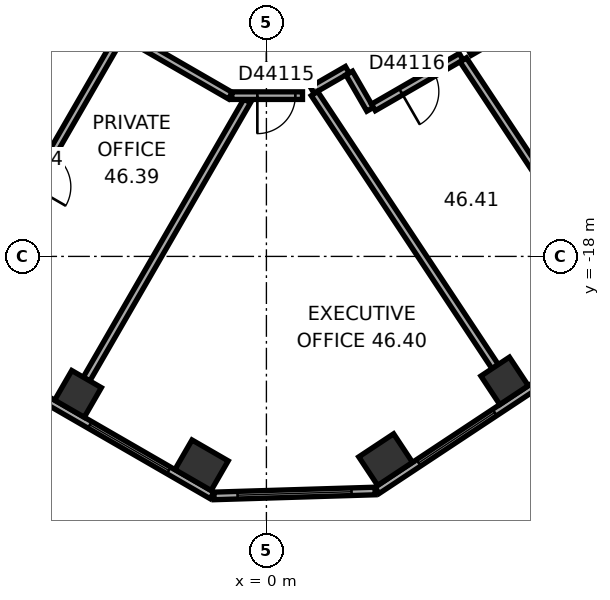
"""IFC4 building model, lengths in metres.
Left out: names, types, materials, properties, quantities, classifications, styles, units other than length and angle.
Written with IfcOpenShell. Run it as: python <this file> out.ifc"""

import sys

from ifc_helpers import new_model, si_unit, direction, frame, frame_2d, origin, origin_2d, place, context, subcontext, project, spatial, rectangle, extrude, element, fill, save


model = new_model("IFC4")
c1 = context("Model", 3, precision=1e-05, world=origin(), true_north=direction((0.0, 1.0)))
c2 = subcontext(c1, "Body", "Model", "MODEL_VIEW")
j1 = project(units=[si_unit("LENGTHUNIT", "METRE"), si_unit("PLANEANGLEUNIT", "RADIAN")], contexts=[c1])
p1 = place(None, origin())
s1 = spatial("IfcSite", under=j1, at=p1, CompositionType="ELEMENT")
p2 = place(p1, origin())
s2 = spatial("IfcBuilding", under=s1, at=p2, CompositionType="ELEMENT")
p3 = place(p2, frame((0.0, 0.0, 187.3)))
s3 = spatial("IfcBuildingStorey", under=s2, at=p3, CompositionType="ELEMENT", Elevation=187.3)
p4 = place(p3, frame((-4.958, -21.617, 0.0), z_axis=(0.0, 0.0, 1.0), x_axis=(0.866025403784, -0.5, 0.0)))
e1 = element("IfcColumn", 1, at=p4, inside=s3, PredefinedType="COLUMN", context=c2, shape_type="SweptSolid", body=[
    extrude(rectangle(XDim=0.9, YDim=0.9, at=origin_2d()), origin(), (0.0, 0.0, 1.0), 3.7),
])
for number, where, z_axis, x_axis in (
    (2, (-1.706, -23.494, 0.0), (0.0, 0.0, 1.0), (0.866, -0.5, 0.0)),
    (3, (3.137, -23.346, 0.0), (0.0, 0.0, 1.0), (0.834, 0.552, 0.0)),
):
    element("IfcColumn", number, at=place(p3, frame(where, z_axis=z_axis, x_axis=x_axis)), inside=s3, PredefinedType="COLUMN", context=c2, shape_type="SweptSolid", body=[
        extrude(rectangle(XDim=1.1, YDim=0.9, at=origin_2d()), origin(), (0.0, 0.0, 1.0), 3.7),
    ])
p5 = place(p3, frame((6.268, -21.274, 0.0), z_axis=(0.0, 0.0, 1.0), x_axis=(0.833885822067, 0.551936985312, 0.0)))
e4 = element("IfcColumn", 4, at=p5, inside=s3, PredefinedType="COLUMN", context=c2, shape_type="SweptSolid", body=[
    extrude(rectangle(XDim=0.9, YDim=0.9, at=origin_2d()), origin(), (0.0, 0.0, 1.0), 3.7),
])
p6 = place(p3, frame((-18.789, -14.267, 0.0), z_axis=(0.0, 0.0, 1.0), x_axis=(0.866023315909, -0.500003616288, 0.0)))
e5 = element("IfcWall", 5, at=p6, inside=s3, PredefinedType="STANDARD", context=c2, shape_type="SweptSolid", body=[
    extrude(rectangle(XDim=20.044, YDim=0.2, at=frame_2d((10.022, 0.0))), origin(), (0.0, 0.0, 1.0), 3.7),
])
p7 = place(p6, frame((1.314, 0.0, 0.9)))
e6 = element("IfcOpeningElement", 6, at=p7, cuts=e5, PredefinedType="OPENING", context=c2, shape_type="SweptSolid", body=[
    extrude(rectangle(XDim=2.4, YDim=2.0, at=frame_2d((1.2, 1.0))), frame((0.0, 0.11, 0.0), z_axis=(0.0, -1.0, 0.0), x_axis=(1.0, 0.0, 0.0)), (0.0, 0.0, 1.0), 0.22),
])
p8 = place(p6, frame((5.069, 0.0, 0.9)))
e7 = element("IfcOpeningElement", 7, at=p8, cuts=e5, PredefinedType="OPENING", context=c2, shape_type="SweptSolid", body=[
    extrude(rectangle(XDim=2.4, YDim=2.0, at=frame_2d((1.2, 1.0))), frame((0.0, 0.11, 0.0), z_axis=(0.0, -1.0, 0.0), x_axis=(1.0, 0.0, 0.0)), (0.0, 0.0, 1.0), 0.22),
])
p9 = place(p6, frame((8.823, 0.0, 0.9)))
e8 = element("IfcOpeningElement", 8, at=p9, cuts=e5, PredefinedType="OPENING", context=c2, shape_type="SweptSolid", body=[
    extrude(rectangle(XDim=2.4, YDim=2.0, at=frame_2d((1.2, 1.0))), frame((0.0, 0.11, 0.0), z_axis=(0.0, -1.0, 0.0), x_axis=(1.0, 0.0, 0.0)), (0.0, 0.0, 1.0), 0.22),
])
p10 = place(p6, frame((12.577, 0.0, 0.9)))
e9 = element("IfcOpeningElement", 9, at=p10, cuts=e5, PredefinedType="OPENING", context=c2, shape_type="SweptSolid", body=[
    extrude(rectangle(XDim=2.4, YDim=2.0, at=frame_2d((1.2, 1.0))), frame((0.0, 0.11, 0.0), z_axis=(0.0, -1.0, 0.0), x_axis=(1.0, 0.0, 0.0)), (0.0, 0.0, 1.0), 0.22),
])
p11 = place(p6, frame((16.331, 0.0, 0.9)))
e10 = element("IfcOpeningElement", 10, at=p11, cuts=e5, PredefinedType="OPENING", context=c2, shape_type="SweptSolid", body=[
    extrude(rectangle(XDim=2.4, YDim=2.0, at=frame_2d((1.2, 1.0))), frame((0.0, 0.11, 0.0), z_axis=(0.0, -1.0, 0.0), x_axis=(1.0, 0.0, 0.0)), (0.0, 0.0, 1.0), 0.22),
])
p12 = place(p3, frame((-1.378, -24.302, 0.0), z_axis=(0.0, 0.0, 1.0), x_axis=(0.999533857267, 0.030529791629, 0.0)))
e11 = element("IfcWall", 11, at=p12, inside=s3, PredefinedType="STANDARD", context=c2, shape_type="SweptSolid", body=[
    extrude(rectangle(XDim=4.238, YDim=0.2, at=frame_2d((2.119, 0.0))), origin(), (0.0, 0.0, 1.0), 3.7),
])
p13 = place(p12, frame((0.619, 0.0, 0.9)))
e12 = element("IfcOpeningElement", 12, at=p13, cuts=e11, PredefinedType="OPENING", context=c2, shape_type="SweptSolid", body=[
    extrude(rectangle(XDim=3.0, YDim=2.0, at=frame_2d((1.5, 1.0))), frame((0.0, 0.11, 0.0), z_axis=(0.0, -1.0, 0.0), x_axis=(1.0, 0.0, 0.0)), (0.0, 0.0, 1.0), 0.22),
])
p14 = place(p3, frame((2.911, -24.156, 0.0), z_axis=(0.0, 0.0, 1.0), x_axis=(0.833882163564, 0.551942512668, 0.0)))
e13 = element("IfcWall", 13, at=p14, inside=s3, PredefinedType="STANDARD", context=c2, shape_type="SweptSolid", body=[
    extrude(rectangle(XDim=20.044, YDim=0.2, at=frame_2d((10.022, 0.0))), origin(), (0.0, 0.0, 1.0), 3.7),
])
p15 = place(p14, frame((1.313, 0.0, 0.9)))
e14 = element("IfcOpeningElement", 14, at=p15, cuts=e13, PredefinedType="OPENING", context=c2, shape_type="SweptSolid", body=[
    extrude(rectangle(XDim=2.4, YDim=2.0, at=frame_2d((1.2, 1.0))), frame((0.0, 0.11, 0.0), z_axis=(0.0, -1.0, 0.0), x_axis=(1.0, 0.0, 0.0)), (0.0, 0.0, 1.0), 0.22),
])
p16 = place(p14, frame((5.067, 0.0, 0.9)))
e15 = element("IfcOpeningElement", 15, at=p16, cuts=e13, PredefinedType="OPENING", context=c2, shape_type="SweptSolid", body=[
    extrude(rectangle(XDim=2.4, YDim=2.0, at=frame_2d((1.2, 1.0))), frame((0.0, 0.11, 0.0), z_axis=(0.0, -1.0, 0.0), x_axis=(1.0, 0.0, 0.0)), (0.0, 0.0, 1.0), 0.22),
])
p17 = place(p14, frame((8.821, 0.0, 0.9)))
e16 = element("IfcOpeningElement", 16, at=p17, cuts=e13, PredefinedType="OPENING", context=c2, shape_type="SweptSolid", body=[
    extrude(rectangle(XDim=2.4, YDim=2.0, at=frame_2d((1.2, 1.0))), frame((0.0, 0.11, 0.0), z_axis=(0.0, -1.0, 0.0), x_axis=(1.0, 0.0, 0.0)), (0.0, 0.0, 1.0), 0.22),
])
p18 = place(p14, frame((12.575, 0.0, 0.9)))
e17 = element("IfcOpeningElement", 17, at=p18, cuts=e13, PredefinedType="OPENING", context=c2, shape_type="SweptSolid", body=[
    extrude(rectangle(XDim=2.4, YDim=2.0, at=frame_2d((1.2, 1.0))), frame((0.0, 0.11, 0.0), z_axis=(0.0, -1.0, 0.0), x_axis=(1.0, 0.0, 0.0)), (0.0, 0.0, 1.0), 0.22),
])
p19 = place(p14, frame((16.329, 0.0, 0.9)))
e18 = element("IfcOpeningElement", 18, at=p19, cuts=e13, PredefinedType="OPENING", context=c2, shape_type="SweptSolid", body=[
    extrude(rectangle(XDim=2.4, YDim=2.0, at=frame_2d((1.2, 1.0))), frame((0.0, 0.11, 0.0), z_axis=(0.0, -1.0, 0.0), x_axis=(1.0, 0.0, 0.0)), (0.0, 0.0, 1.0), 0.22),
])
p20 = place(p3, frame((-7.984, -19.351, 0.0), z_axis=(0.0, 0.0, 1.0), x_axis=(0.500010139422, 0.866019549707, 0.0)))
e19 = element("IfcWall", 19, at=p20, inside=s3, PredefinedType="PARTITIONING", context=c2, shape_type="SweptSolid", body=[
    extrude(rectangle(XDim=8.35, YDim=0.2, at=frame_2d((4.175, 0.0))), origin(), (0.0, 0.0, 1.0), 3.42),
])
p21 = place(p20, frame((3.675, 0.0, 0.0)))
e20 = element("IfcOpeningElement", 20, at=p21, cuts=e19, PredefinedType="OPENING", context=c2, shape_type="SweptSolid", body=[
    extrude(rectangle(XDim=1.0, YDim=2.1, at=frame_2d((0.5, 1.05))), frame((0.0, 0.11, 0.0), z_axis=(0.0, -1.0, 0.0), x_axis=(1.0, 0.0, 0.0)), (0.0, 0.0, 1.0), 0.22),
])
p22 = place(p3, frame((-4.732, -21.228, 0.0), z_axis=(0.0, 0.0, 1.0), x_axis=(0.500000843414, 0.866024916838, 0.0)))
e21 = element("IfcWall", 21, at=p22, inside=s3, PredefinedType="PARTITIONING", context=c2, shape_type="SweptSolid", body=[
    extrude(rectangle(XDim=8.452, YDim=0.2, at=frame_2d((4.226, 0.0))), origin(), (0.0, 0.0, 1.0), 3.42),
])
p23 = place(p3, frame((-3.722, -12.169, 0.0), z_axis=(0.0, 0.0, 1.0), x_axis=(0.866033163891, -0.499986558861, 0.0)))
e22 = element("IfcWall", 22, at=p23, inside=s3, PredefinedType="PARTITIONING", context=c2, shape_type="SweptSolid", body=[
    extrude(rectangle(XDim=3.201, YDim=0.2, at=frame_2d((1.6, 0.0))), origin(), (0.0, 0.0, 1.0), 3.42),
])
p24 = place(p3, frame((-0.91, -13.77, 0.0), z_axis=(0.0, 0.0, 1.0), x_axis=(1.0, 0.0, 0.0)))
e23 = element("IfcWall", 23, at=p24, inside=s3, PredefinedType="PARTITIONING", context=c2, shape_type="SweptSolid", body=[
    extrude(rectangle(XDim=1.86, YDim=0.2, at=frame_2d((0.93, 0.0))), origin(), (0.0, 0.0, 1.0), 3.42),
])
p25 = place(p24, frame((0.672, 0.0, 0.0)))
e24 = element("IfcOpeningElement", 24, at=p25, cuts=e23, PredefinedType="OPENING", context=c2, shape_type="SweptSolid", body=[
    extrude(rectangle(XDim=1.0, YDim=2.1, at=frame_2d((0.5, 1.05))), frame((0.0, 0.11, 0.0), z_axis=(0.0, -1.0, 0.0), x_axis=(1.0, 0.0, 0.0)), (0.0, 0.0, 1.0), 0.22),
])
p26 = place(p3, frame((1.204, -13.623, 0.0), z_axis=(0.0, 0.0, 1.0), x_axis=(0.866040989419, 0.499973003918, 0.0)))
e25 = element("IfcWall", 25, at=p26, inside=s3, PredefinedType="PARTITIONING", context=c2, shape_type="SweptSolid", body=[
    extrude(rectangle(XDim=1.068, YDim=0.2, at=frame_2d((0.534, 0.0))), origin(), (0.0, 0.0, 1.0), 3.42),
])
p27 = place(p3, frame((2.179, -13.176, 0.0), z_axis=(0.0, 0.0, 1.0), x_axis=(0.499978356969, -0.866037899034, 0.0)))
e26 = element("IfcWall", 26, at=p27, inside=s3, PredefinedType="PARTITIONING", context=c2, shape_type="SweptSolid", body=[
    extrude(rectangle(XDim=1.101, YDim=0.2, at=frame_2d((0.551, 0.0))), origin(), (0.0, 0.0, 1.0), 3.42),
])
p28 = place(p3, frame((2.816, -14.079, 0.0), z_axis=(0.0, 0.0, 1.0), x_axis=(0.866008705299, 0.50002892151, 0.0)))
e27 = element("IfcWall", 27, at=p28, inside=s3, PredefinedType="PARTITIONING", context=c2, shape_type="SweptSolid", body=[
    extrude(rectangle(XDim=2.666, YDim=0.2, at=frame_2d((1.333, 0.0))), origin(), (0.0, 0.0, 1.0), 3.42),
])
p29 = place(p28, frame((0.833, 0.0, 0.0)))
e28 = element("IfcOpeningElement", 28, at=p29, cuts=e27, PredefinedType="OPENING", context=c2, shape_type="SweptSolid", body=[
    extrude(rectangle(XDim=1.0, YDim=2.1, at=frame_2d((0.5, 1.05))), frame((0.0, 0.11, 0.0), z_axis=(0.0, -1.0, 0.0), x_axis=(1.0, 0.0, 0.0)), (0.0, 0.0, 1.0), 0.22),
])
p30 = place(p3, frame((5.342, -12.621, 0.0), z_axis=(0.0, 0.0, 1.0), x_axis=(0.866024665123, 0.500001279396, 0.0)))
e29 = element("IfcWall", 29, at=p30, inside=s3, PredefinedType="PARTITIONING", context=c2, shape_type="SweptSolid", body=[
    extrude(rectangle(XDim=5.786, YDim=0.2, at=frame_2d((2.893, 0.0))), origin(), (0.0, 0.0, 1.0), 3.42),
])
p31 = place(p3, frame((6.02, -20.899, 0.0), z_axis=(0.0, 0.0, 1.0), x_axis=(-0.551943990108, 0.833881185651, 0.0)))
e30 = element("IfcWall", 30, at=p31, inside=s3, PredefinedType="PARTITIONING", context=c2, shape_type="SweptSolid", body=[
    extrude(rectangle(XDim=8.615, YDim=0.2, at=frame_2d((4.308, 0.0))), origin(), (0.0, 0.0, 1.0), 3.42),
])
p32 = place(p3, frame((9.15, -18.827, 0.0), z_axis=(0.0, 0.0, 1.0), x_axis=(-0.551939801345, 0.833883958169, 0.0)))
e31 = element("IfcWall", 31, at=p32, inside=s3, PredefinedType="PARTITIONING", context=c2, shape_type="SweptSolid", body=[
    extrude(rectangle(XDim=7.192, YDim=0.2, at=frame_2d((3.596, 0.0))), origin(), (0.0, 0.0, 1.0), 2.87),
])
p33 = place(p11, origin())
e32 = element("IfcWindow", 32, at=p33, inside=s3, PartitioningType="SINGLE_PANEL", PredefinedType="WINDOW", context=c2, shape_type="SweptSolid", body=[
    extrude(rectangle(XDim=2.4, YDim=2.0, at=frame_2d((1.2, 1.0))), frame((0.0, 0.03, 0.0), z_axis=(0.0, -1.0, 0.0), x_axis=(1.0, 0.0, 0.0)), (0.0, 0.0, 1.0), 0.06),
])
fill(e10, e32)
p34 = place(p13, origin())
e33 = element("IfcWindow", 33, at=p34, inside=s3, PartitioningType="SINGLE_PANEL", PredefinedType="WINDOW", context=c2, shape_type="SweptSolid", body=[
    extrude(rectangle(XDim=3.0, YDim=2.0, at=frame_2d((1.5, 1.0))), frame((0.0, 0.03, 0.0), z_axis=(0.0, -1.0, 0.0), x_axis=(1.0, 0.0, 0.0)), (0.0, 0.0, 1.0), 0.06),
])
fill(e12, e33)
p35 = place(p15, origin())
e34 = element("IfcWindow", 34, at=p35, inside=s3, PartitioningType="SINGLE_PANEL", PredefinedType="WINDOW", context=c2, shape_type="SweptSolid", body=[
    extrude(rectangle(XDim=2.4, YDim=2.0, at=frame_2d((1.2, 1.0))), frame((0.0, 0.03, 0.0), z_axis=(0.0, -1.0, 0.0), x_axis=(1.0, 0.0, 0.0)), (0.0, 0.0, 1.0), 0.06),
])
fill(e14, e34)
p36 = place(p21, origin())
e35 = element("IfcDoor", 35, at=p36, inside=s3, OperationType="SINGLE_SWING_LEFT", PredefinedType="DOOR", context=c2, shape_type="SweptSolid", body=[
    extrude(rectangle(XDim=1.0, YDim=2.1, at=frame_2d((0.5, 1.05))), frame((0.0, 0.025, 0.0), z_axis=(0.0, -1.0, 0.0), x_axis=(1.0, 0.0, 0.0)), (0.0, 0.0, 1.0), 0.05),
])
fill(e20, e35)
p37 = place(p25, origin())
e36 = element("IfcDoor", 36, at=p37, inside=s3, OperationType="SINGLE_SWING_LEFT", PredefinedType="DOOR", context=c2, shape_type="SweptSolid", body=[
    extrude(rectangle(XDim=1.0, YDim=2.1, at=frame_2d((0.5, 1.05))), frame((0.0, 0.025, 0.0), z_axis=(0.0, -1.0, 0.0), x_axis=(1.0, 0.0, 0.0)), (0.0, 0.0, 1.0), 0.05),
])
fill(e24, e36)
p38 = place(p29, origin())
e37 = element("IfcDoor", 37, at=p38, inside=s3, OperationType="SINGLE_SWING_LEFT", PredefinedType="DOOR", context=c2, shape_type="SweptSolid", body=[
    extrude(rectangle(XDim=1.0, YDim=2.1, at=frame_2d((0.5, 1.05))), frame((0.0, 0.025, 0.0), z_axis=(0.0, -1.0, 0.0), x_axis=(1.0, 0.0, 0.0)), (0.0, 0.0, 1.0), 0.05),
])
fill(e28, e37)
save(model, sys.argv[1])
